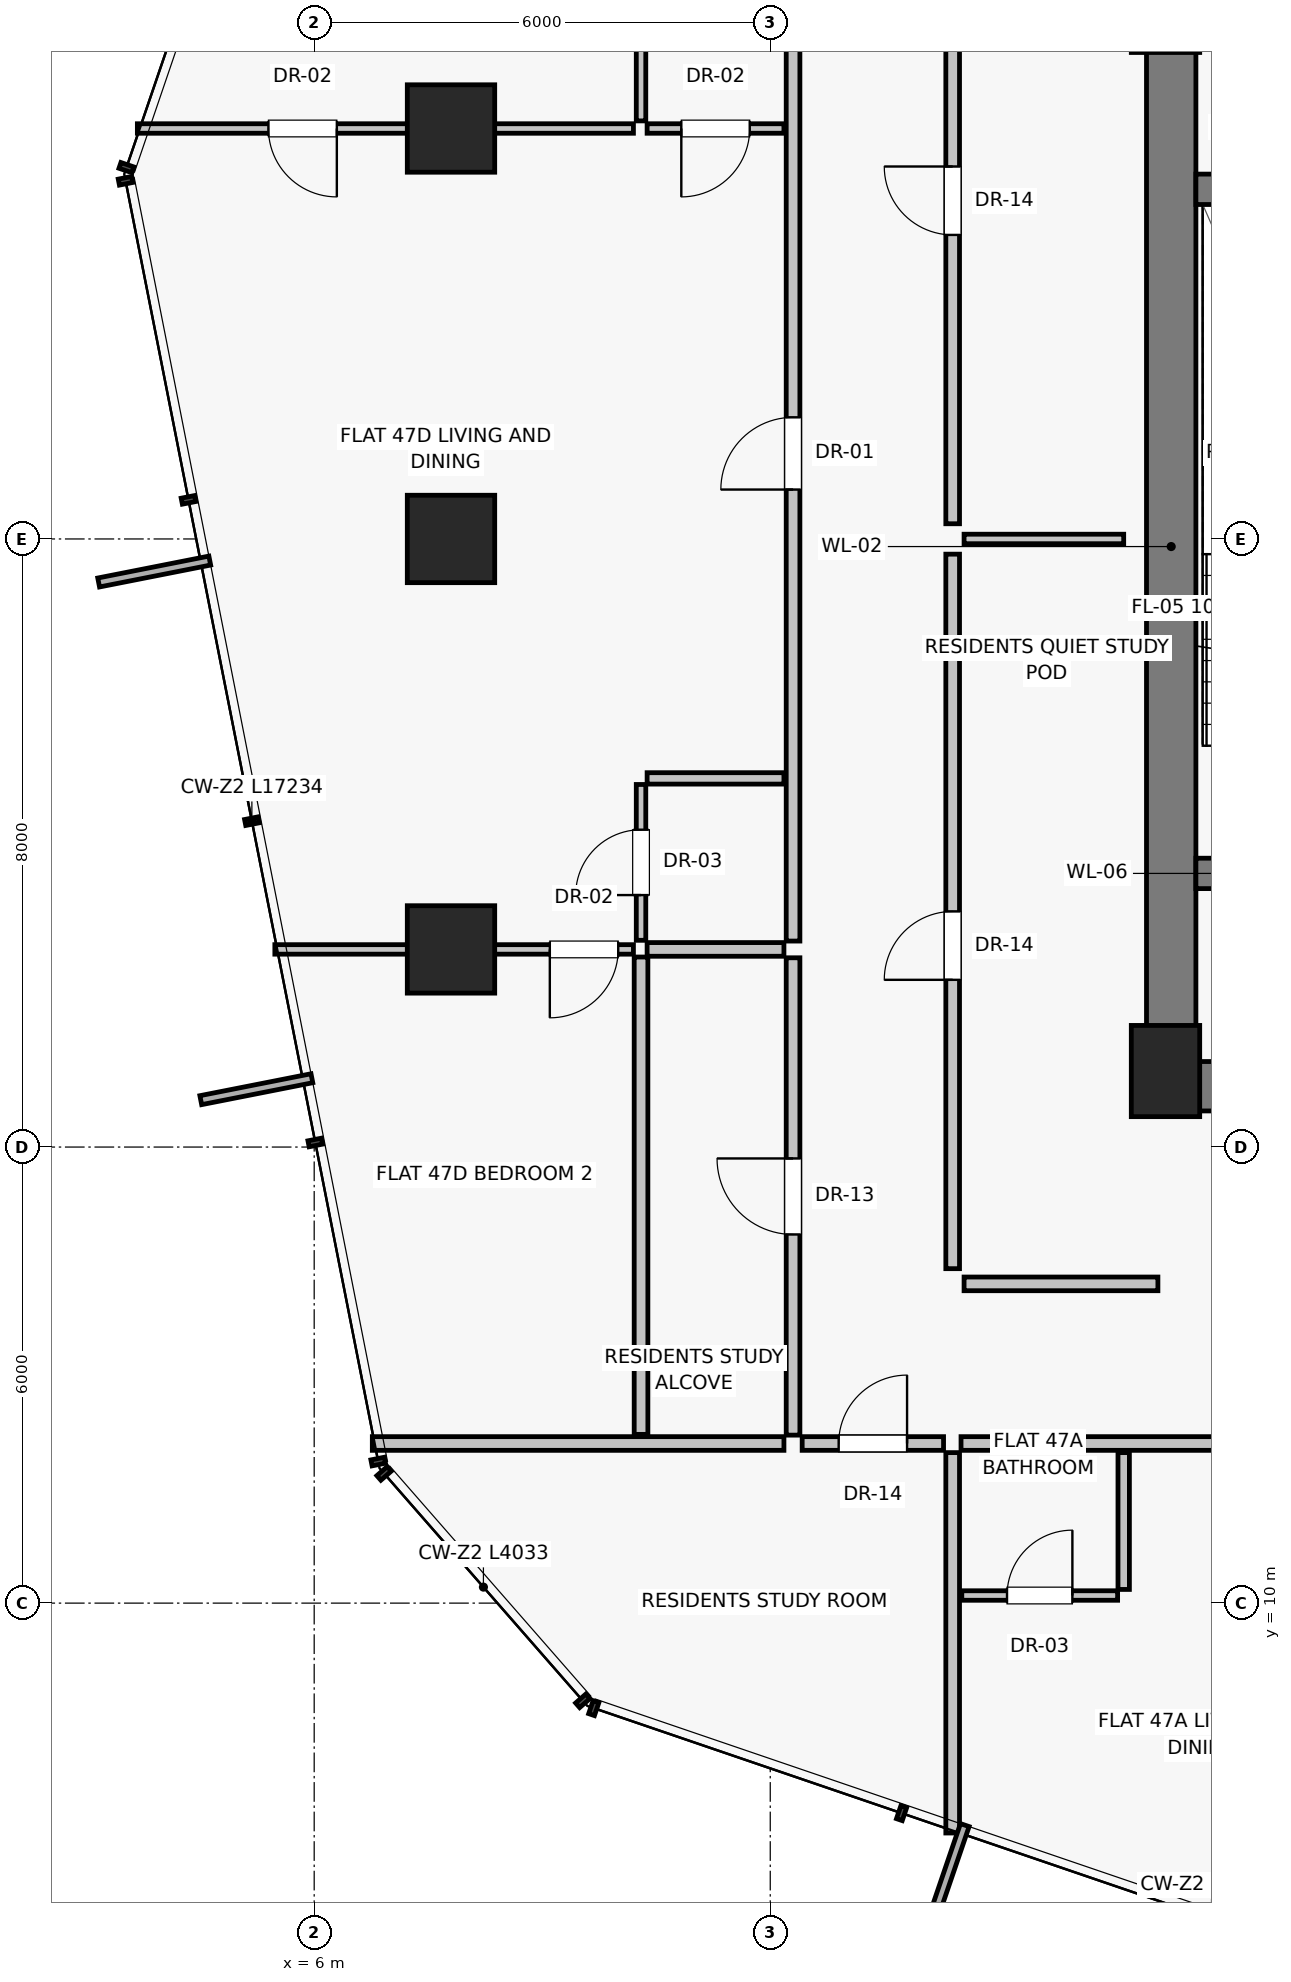
"""IFC4 building model, lengths in metres.
Left out: names, types, materials, properties, quantities, classifications, styles, units other than length and angle.
Written with IfcOpenShell. Run it as: python <this file> out.ifc"""

import sys

from ifc_helpers import new_model, si_unit, direction, frame, frame_2d, origin, origin_2d, place, context, subcontext, project, spatial, rectangle, extrude, source, transform, mapped, element, fill, save


model = new_model("IFC4")
c1 = context("Model", 3, precision=1e-05, world=origin(), true_north=direction((0.0, 1.0)))
c2 = subcontext(c1, "Body", "Model", "MODEL_VIEW")
j1 = project(units=[si_unit("LENGTHUNIT", "METRE"), si_unit("PLANEANGLEUNIT", "RADIAN")], contexts=[c1])
p1 = place(None, origin())
s1 = spatial("IfcSite", under=j1, at=p1, CompositionType="ELEMENT")
p2 = place(p1, origin())
s2 = spatial("IfcBuilding", under=s1, at=p2, CompositionType="ELEMENT")
p3 = place(p2, frame((0.0, 0.0, 166.3)))
s3 = spatial("IfcBuildingStorey", under=s2, at=p3, CompositionType="ELEMENT", Elevation=166.3)
p4 = place(p3, frame((17.2, 17.0, 0.0), z_axis=(0.0, 0.0, 1.0), x_axis=(1.0, 0.0, 0.0)))
e1 = element("IfcColumn", 1, at=p4, inside=s3, PredefinedType="PILASTER", context=c2, shape_type="SweptSolid", body=[
    extrude(rectangle(XDim=0.9, YDim=1.2, at=origin_2d()), origin(), (0.0, 0.0, 1.0), 3.25),
])
for number, where, z_axis, x_axis in (
    (2, (7.8, 29.4, 0.0), (0.0, 0.0, 1.0), (1.0, 0.0, 0.0)),
    (3, (7.8, 24.0, 0.0), (0.0, 0.0, 1.0), (1.0, 0.0, 0.0)),
    (4, (7.8, 18.6, 0.0), (0.0, 0.0, 1.0), (1.0, 0.0, 0.0)),
):
    element("IfcColumn", number, at=place(p3, frame(where, z_axis=z_axis, x_axis=x_axis)), inside=s3, PredefinedType="COLUMN", context=c2, shape_type="SweptSolid", body=[
        extrude(rectangle(XDim=1.15, YDim=1.15, at=origin_2d()), origin(), (0.0, 0.0, 1.0), 3.25),
    ])
p5 = place(p3, frame((17.275, 16.8, 0.0), z_axis=(0.0, 0.0, 1.0), x_axis=(0.0, 1.0, 0.0)))
e5 = element("IfcWall", 5, at=p5, inside=s3, PredefinedType="SHEAR", context=c2, shape_type="SweptSolid", body=[
    extrude(rectangle(XDim=14.2, YDim=0.65, at=frame_2d((7.1, 0.0))), origin(), (0.0, 0.0, 1.0), 2.93),
])
p6 = place(p3, frame((17.2, 16.8, 0.0), z_axis=(0.0, 0.0, 1.0), x_axis=(1.0, 0.0, 0.0)))
e6 = element("IfcWall", 6, at=p6, inside=s3, PredefinedType="SHEAR", context=c2, shape_type="SweptSolid", body=[
    extrude(rectangle(XDim=5.85, YDim=0.65, at=frame_2d((2.925, 0.0))), origin(), (0.0, 0.0, 1.0), 2.93),
])
p7 = place(p6, frame((1.15, 0.0, 0.0)))
e7 = element("IfcOpeningElement", 7, at=p7, cuts=e6, PredefinedType="OPENING", context=c2, shape_type="SweptSolid", body=[
    extrude(rectangle(XDim=1.2, YDim=2.03, at=frame_2d((0.6, 1.015))), frame((0.0, 0.335, 0.0), z_axis=(0.0, -1.0, 0.0), x_axis=(1.0, 0.0, 0.0)), (0.0, 0.0, 1.0), 0.67),
])
p8 = place(p3, frame((17.6, 19.6, 0.0), z_axis=(0.0, 0.0, 1.0), x_axis=(1.0, 0.0, 0.0)))
e8 = element("IfcWall", 8, at=p8, inside=s3, PredefinedType="SHEAR", context=c2, shape_type="SweptSolid", body=[
    extrude(rectangle(XDim=3.4, YDim=0.4, at=frame_2d((1.7, 0.0))), origin(), (0.0, 0.0, 1.0), 2.93),
])
p9 = place(p8, frame((1.05, 0.0, 0.0)))
e9 = element("IfcOpeningElement", 9, at=p9, cuts=e8, PredefinedType="OPENING", context=c2, shape_type="SweptSolid", body=[
    extrude(rectangle(XDim=1.1, YDim=2.03, at=frame_2d((0.55, 1.015))), frame((0.0, 0.21, 0.0), z_axis=(0.0, -1.0, 0.0), x_axis=(1.0, 0.0, 0.0)), (0.0, 0.0, 1.0), 0.42),
])
p10 = place(p3, frame((17.6, 28.6, 0.0), z_axis=(0.0, 0.0, 1.0), x_axis=(1.0, 0.0, 0.0)))
e10 = element("IfcWall", 10, at=p10, inside=s3, PredefinedType="SHEAR", context=c2, shape_type="SweptSolid", body=[
    extrude(rectangle(XDim=3.4, YDim=0.4, at=frame_2d((1.7, 0.0))), origin(), (0.0, 0.0, 1.0), 2.93),
])
p11 = place(p3, frame((14.4, 14.4, 0.0), z_axis=(0.0, 0.0, 1.0), x_axis=(0.0, 1.0, 0.0)))
e11 = element("IfcWall", 11, at=p11, inside=s3, PredefinedType="PARTITIONING", context=c2, shape_type="SweptSolid", body=[
    extrude(rectangle(XDim=9.4, YDim=0.18, at=frame_2d((4.7, 0.0))), origin(), (0.0, 0.0, 1.0), 2.93),
])
p12 = place(p11, frame((3.8, 0.0, 0.0)))
e12 = element("IfcOpeningElement", 12, at=p12, cuts=e11, PredefinedType="OPENING", context=c2, shape_type="SweptSolid", body=[
    extrude(rectangle(XDim=0.9, YDim=2.01, at=frame_2d((0.45, 1.005))), frame((0.0, 0.1, 0.0), z_axis=(0.0, -1.0, 0.0), x_axis=(1.0, 0.0, 0.0)), (0.0, 0.0, 1.0), 0.2),
])
p13 = place(p3, frame((14.4, 24.2, 0.0), z_axis=(0.0, 0.0, 1.0), x_axis=(0.0, 1.0, 0.0)))
e13 = element("IfcWall", 13, at=p13, inside=s3, PredefinedType="PARTITIONING", context=c2, shape_type="SweptSolid", body=[
    extrude(rectangle(XDim=9.2, YDim=0.18, at=frame_2d((4.6, 0.0))), origin(), (0.0, 0.0, 1.0), 2.93),
])
p14 = place(p13, frame((3.8, 0.0, 0.0)))
e14 = element("IfcOpeningElement", 14, at=p14, cuts=e13, PredefinedType="OPENING", context=c2, shape_type="SweptSolid", body=[
    extrude(rectangle(XDim=0.9, YDim=2.01, at=frame_2d((0.45, 1.005))), frame((0.0, 0.1, 0.0), z_axis=(0.0, -1.0, 0.0), x_axis=(1.0, 0.0, 0.0)), (0.0, 0.0, 1.0), 0.2),
])
p15 = place(p3, frame((14.55, 24.0, 0.0), z_axis=(0.0, 0.0, 1.0), x_axis=(1.0, 0.0, 0.0)))
e15 = element("IfcWall", 15, at=p15, inside=s3, PredefinedType="PARTITIONING", context=c2, shape_type="SweptSolid", body=[
    extrude(rectangle(XDim=2.1, YDim=0.125, at=frame_2d((1.05, 0.0))), origin(), (0.0, 0.0, 1.0), 2.93),
])
p16 = place(p3, frame((14.55, 14.2, 0.0), z_axis=(0.0, 0.0, 1.0), x_axis=(1.0, 0.0, 0.0)))
e16 = element("IfcWall", 16, at=p16, inside=s3, PredefinedType="PARTITIONING", context=c2, shape_type="SweptSolid", body=[
    extrude(rectangle(XDim=2.55, YDim=0.18, at=frame_2d((1.275, 0.0))), origin(), (0.0, 0.0, 1.0), 2.93),
])
p17 = place(p3, frame((14.4, 11.98, 0.0), z_axis=(0.0, 0.0, 1.0), x_axis=(0.0, -1.0, 0.0)))
e17 = element("IfcWall", 17, at=p17, inside=s3, PredefinedType="PARTITIONING", context=c2, shape_type="SweptSolid", body=[
    extrude(rectangle(XDim=5.004, YDim=0.18, at=frame_2d((2.502, 0.0))), origin(), (0.0, 0.0, 1.0), 2.93),
])
p18 = place(p3, frame((14.51, 12.1, 0.0), z_axis=(0.0, 0.0, 1.0), x_axis=(1.0, 0.0, 0.0)))
e18 = element("IfcWall", 18, at=p18, inside=s3, PredefinedType="PARTITIONING", context=c2, shape_type="SweptSolid", body=[
    extrude(rectangle(XDim=11.136, YDim=0.18, at=frame_2d((5.568, 0.0))), origin(), (0.0, 0.0, 1.0), 2.51),
])
p19 = place(p18, frame((3.663, 0.0, 0.0)))
e19 = element("IfcOpeningElement", 19, at=p19, cuts=e18, PredefinedType="OPENING", context=c2, shape_type="SweptSolid", body=[
    extrude(rectangle(XDim=0.95, YDim=2.02, at=frame_2d((0.475, 1.01))), frame((0.0, 0.1, 0.0), z_axis=(0.0, -1.0, 0.0), x_axis=(1.0, 0.0, 0.0)), (0.0, 0.0, 1.0), 0.2),
])
p20 = place(p3, frame((16.65, 11.98, 0.0), z_axis=(0.0, 0.0, 1.0), x_axis=(0.0, -1.0, 0.0)))
e20 = element("IfcWall", 20, at=p20, inside=s3, PredefinedType="PARTITIONING", context=c2, shape_type="SweptSolid", body=[
    extrude(rectangle(XDim=1.8, YDim=0.15, at=frame_2d((0.9, 0.0))), origin(), (0.0, 0.0, 1.0), 2.93),
])
p21 = place(p3, frame((14.52, 10.1, 0.0), z_axis=(0.0, 0.0, 1.0), x_axis=(1.0, 0.0, 0.0)))
e21 = element("IfcWall", 21, at=p21, inside=s3, PredefinedType="PARTITIONING", context=c2, shape_type="SweptSolid", body=[
    extrude(rectangle(XDim=2.05, YDim=0.125, at=frame_2d((1.025, 0.0))), origin(), (0.0, 0.0, 1.0), 2.93),
])
p22 = place(p21, frame((0.595, 0.0, 0.0)))
e22 = element("IfcOpeningElement", 22, at=p22, cuts=e21, PredefinedType="OPENING", context=c2, shape_type="SweptSolid", body=[
    extrude(rectangle(XDim=0.86, YDim=2.01, at=frame_2d((0.43, 1.005))), frame((0.0, 0.073, 0.0), z_axis=(0.0, -1.0, 0.0), x_axis=(1.0, 0.0, 0.0)), (0.0, 0.0, 1.0), 0.145),
])
p23 = place(p3, frame((12.18, 12.1, 0.0), z_axis=(0.0, 0.0, 1.0), x_axis=(-1.0, 0.0, 0.0)))
e23 = element("IfcWall", 23, at=p23, inside=s3, PredefinedType="PARTITIONING", context=c2, shape_type="SweptSolid", body=[
    extrude(rectangle(XDim=5.415, YDim=0.18, at=frame_2d((2.708, 0.0))), origin(), (0.0, 0.0, 1.0), 2.93),
])
p24 = place(p3, frame((12.3, 12.21, 0.0), z_axis=(0.0, 0.0, 1.0), x_axis=(0.0, 1.0, 0.0)))
e24 = element("IfcWall", 24, at=p24, inside=s3, PredefinedType="PARTITIONING", context=c2, shape_type="SweptSolid", body=[
    extrude(rectangle(XDim=6.28, YDim=0.18, at=frame_2d((3.14, 0.0))), origin(), (0.0, 0.0, 1.0), 2.51),
])
p25 = place(p24, frame((2.64, 0.0, 0.0)))
e25 = element("IfcOpeningElement", 25, at=p25, cuts=e24, PredefinedType="OPENING", context=c2, shape_type="SweptSolid", body=[
    extrude(rectangle(XDim=1.0, YDim=2.01, at=frame_2d((0.5, 1.005))), frame((0.0, 0.1, 0.0), z_axis=(0.0, -1.0, 0.0), x_axis=(1.0, 0.0, 0.0)), (0.0, 0.0, 1.0), 0.2),
])
p26 = place(p3, frame((12.3, 18.71, 0.0), z_axis=(0.0, 0.0, 1.0), x_axis=(0.0, 1.0, 0.0)))
e26 = element("IfcWall", 26, at=p26, inside=s3, PredefinedType="PARTITIONING", context=c2, shape_type="SweptSolid", body=[
    extrude(rectangle(XDim=16.88, YDim=0.18, at=frame_2d((8.44, 0.0))), origin(), (0.0, 0.0, 1.0), 2.51),
])
p27 = place(p26, frame((5.94, 0.0, 0.0)))
e27 = element("IfcOpeningElement", 27, at=p27, cuts=e26, PredefinedType="OPENING", context=c2, shape_type="SweptSolid", body=[
    extrude(rectangle(XDim=0.95, YDim=2.02, at=frame_2d((0.475, 1.01))), frame((0.0, 0.1, 0.0), z_axis=(0.0, -1.0, 0.0), x_axis=(1.0, 0.0, 0.0)), (0.0, 0.0, 1.0), 0.2),
])
p28 = place(p3, frame((10.3, 12.22, 0.0), z_axis=(0.0, 0.0, 1.0), x_axis=(0.0, 1.0, 0.0)))
e28 = element("IfcWall", 28, at=p28, inside=s3, PredefinedType="PARTITIONING", context=c2, shape_type="SweptSolid", body=[
    extrude(rectangle(XDim=6.28, YDim=0.18, at=frame_2d((3.14, 0.0))), origin(), (0.0, 0.0, 1.0), 2.93),
])
p29 = place(p3, frame((12.18, 18.6, 0.0), z_axis=(0.0, 0.0, 1.0), x_axis=(-1.0, 0.0, 0.0)))
e29 = element("IfcWall", 29, at=p29, inside=s3, PredefinedType="PARTITIONING", context=c2, shape_type="SweptSolid", body=[
    extrude(rectangle(XDim=1.8, YDim=0.18, at=frame_2d((0.9, 0.0))), origin(), (0.0, 0.0, 1.0), 2.308),
])
p30 = place(p3, frame((10.2, 18.6, 0.0), z_axis=(0.0, 0.0, 1.0), x_axis=(-1.0, 0.0, 0.0)))
e30 = element("IfcWall", 30, at=p30, inside=s3, PredefinedType="PARTITIONING", context=c2, shape_type="SweptSolid", body=[
    extrude(rectangle(XDim=4.718, YDim=0.125, at=frame_2d((2.359, 0.0))), origin(), (0.0, 0.0, 1.0), 2.308),
])
p31 = place(p30, frame((0.2, 0.0, 0.0)))
e31 = element("IfcOpeningElement", 31, at=p31, cuts=e30, PredefinedType="OPENING", context=c2, shape_type="SweptSolid", body=[
    extrude(rectangle(XDim=0.9, YDim=2.01, at=frame_2d((0.45, 1.005))), frame((0.0, 0.073, 0.0), z_axis=(0.0, -1.0, 0.0), x_axis=(1.0, 0.0, 0.0)), (0.0, 0.0, 1.0), 0.145),
])
p32 = place(p3, frame((12.18, 20.85, 0.0), z_axis=(0.0, 0.0, 1.0), x_axis=(-1.0, 0.0, 0.0)))
e32 = element("IfcWall", 32, at=p32, inside=s3, PredefinedType="PARTITIONING", context=c2, shape_type="SweptSolid", body=[
    extrude(rectangle(XDim=1.8, YDim=0.15, at=frame_2d((0.9, 0.0))), origin(), (0.0, 0.0, 1.0), 2.93),
])
p33 = place(p3, frame((10.3, 18.72, 0.0), z_axis=(0.0, 0.0, 1.0), x_axis=(0.0, 1.0, 0.0)))
e33 = element("IfcWall", 33, at=p33, inside=s3, PredefinedType="PARTITIONING", context=c2, shape_type="SweptSolid", body=[
    extrude(rectangle(XDim=2.05, YDim=0.125, at=frame_2d((1.025, 0.0))), origin(), (0.0, 0.0, 1.0), 2.93),
])
p34 = place(p33, frame((0.595, 0.0, 0.0)))
e34 = element("IfcOpeningElement", 34, at=p34, cuts=e33, PredefinedType="OPENING", context=c2, shape_type="SweptSolid", body=[
    extrude(rectangle(XDim=0.86, YDim=2.01, at=frame_2d((0.43, 1.005))), frame((0.0, 0.073, 0.0), z_axis=(0.0, -1.0, 0.0), x_axis=(1.0, 0.0, 0.0)), (0.0, 0.0, 1.0), 0.145),
])
p35 = place(p3, frame((12.18, 29.4, 0.0), z_axis=(0.0, 0.0, 1.0), x_axis=(-1.0, 0.0, 0.0)))
e35 = element("IfcWall", 35, at=p35, inside=s3, PredefinedType="PARTITIONING", context=c2, shape_type="SweptSolid", body=[
    extrude(rectangle(XDim=1.8, YDim=0.125, at=frame_2d((0.9, 0.0))), origin(), (0.0, 0.0, 1.0), 2.308),
])
p36 = place(p35, frame((0.45, 0.0, 0.0)))
e36 = element("IfcOpeningElement", 36, at=p36, cuts=e35, PredefinedType="OPENING", context=c2, shape_type="SweptSolid", body=[
    extrude(rectangle(XDim=0.9, YDim=2.01, at=frame_2d((0.45, 1.005))), frame((0.0, 0.073, 0.0), z_axis=(0.0, -1.0, 0.0), x_axis=(1.0, 0.0, 0.0)), (0.0, 0.0, 1.0), 0.145),
])
p37 = place(p3, frame((10.3, 29.5, 0.0), z_axis=(0.0, 0.0, 1.0), x_axis=(0.0, 1.0, 0.0)))
e37 = element("IfcWall", 37, at=p37, inside=s3, PredefinedType="PARTITIONING", context=c2, shape_type="SweptSolid", body=[
    extrude(rectangle(XDim=6.08, YDim=0.125, at=frame_2d((3.04, 0.0))), origin(), (0.0, 0.0, 1.0), 2.93),
])
p38 = place(p3, frame((10.2, 29.4, 0.0), z_axis=(0.0, 0.0, 1.0), x_axis=(-1.0, 0.0, 0.0)))
e38 = element("IfcWall", 38, at=p38, inside=s3, PredefinedType="PARTITIONING", context=c2, shape_type="SweptSolid", body=[
    extrude(rectangle(XDim=6.526, YDim=0.125, at=frame_2d((3.263, 0.0))), origin(), (0.0, 0.0, 1.0), 2.308),
])
p39 = place(p38, frame((3.902, 0.0, 0.0)))
e39 = element("IfcOpeningElement", 39, at=p39, cuts=e38, PredefinedType="OPENING", context=c2, shape_type="SweptSolid", body=[
    extrude(rectangle(XDim=0.9, YDim=2.01, at=frame_2d((0.45, 1.005))), frame((0.0, 0.073, 0.0), z_axis=(0.0, -1.0, 0.0), x_axis=(1.0, 0.0, 0.0)), (0.0, 0.0, 1.0), 0.145),
])
p40 = place(p3, frame((12.42, 12.1, 0.0), z_axis=(0.0, 0.0, 1.0), x_axis=(1.0, 0.0, 0.0)))
e40 = element("IfcWall", 40, at=p40, inside=s3, PredefinedType="PARTITIONING", context=c2, shape_type="SweptSolid", body=[
    extrude(rectangle(XDim=1.86, YDim=0.18, at=frame_2d((0.93, 0.0))), origin(), (0.0, 0.0, 1.0), 2.93),
])
p41 = place(p40, frame((0.48, 0.0, 0.0)))
e41 = element("IfcOpeningElement", 41, at=p41, cuts=e40, PredefinedType="OPENING", context=c2, shape_type="SweptSolid", body=[
    extrude(rectangle(XDim=0.9, YDim=2.01, at=frame_2d((0.45, 1.005))), frame((0.0, 0.1, 0.0), z_axis=(0.0, -1.0, 0.0), x_axis=(1.0, 0.0, 0.0)), (0.0, 0.0, 1.0), 0.2),
])
m1 = source(origin(), c2, "Body", "SweptSolid", [
    extrude(rectangle(XDim=0.9, YDim=2.01, at=frame_2d((0.45, 1.005))), frame((0.0, 0.025, 0.0), z_axis=(0.0, -1.0, 0.0), x_axis=(1.0, 0.0, 0.0)), (0.0, 0.0, 1.0), 0.05),
])
p42 = place(p12, origin())
e42 = element("IfcDoor", 42, at=p42, inside=s3, OperationType="SINGLE_SWING_LEFT", PredefinedType="DOOR", context=c2, shape_type="MappedRepresentation", body=[
    mapped(m1, transform((0.0, 0.0, 0.0), scale=1.0)),
])
fill(e12, e42)
p43 = place(p14, origin())
e43 = element("IfcDoor", 43, at=p43, inside=s3, OperationType="SINGLE_SWING_RIGHT", PredefinedType="DOOR", context=c2, shape_type="MappedRepresentation", body=[
    mapped(m1, transform((0.0, 0.0, 0.0), scale=1.0)),
])
fill(e14, e43)
m2 = source(origin(), c2, "Body", "SweptSolid", [
    extrude(rectangle(XDim=0.86, YDim=2.01, at=frame_2d((0.43, 1.005))), frame((0.0, 0.025, 0.0), z_axis=(0.0, -1.0, 0.0), x_axis=(1.0, 0.0, 0.0)), (0.0, 0.0, 1.0), 0.05),
])
p44 = place(p22, origin())
e44 = element("IfcDoor", 44, at=p44, inside=s3, OperationType="SINGLE_SWING_RIGHT", PredefinedType="DOOR", context=c2, shape_type="MappedRepresentation", body=[
    mapped(m2, transform((0.0, 0.0, 0.0), scale=1.0)),
])
fill(e22, e44)
m3 = source(origin(), c2, "Body", "SweptSolid", [
    extrude(rectangle(XDim=1.0, YDim=2.01, at=frame_2d((0.5, 1.005))), frame((0.0, 0.025, 0.0), z_axis=(0.0, -1.0, 0.0), x_axis=(1.0, 0.0, 0.0)), (0.0, 0.0, 1.0), 0.05),
])
p45 = place(p25, origin())
e45 = element("IfcDoor", 45, at=p45, inside=s3, OperationType="SINGLE_SWING_RIGHT", PredefinedType="DOOR", context=c2, shape_type="MappedRepresentation", body=[
    mapped(m3, transform((0.0, 0.0, 0.0), scale=1.0)),
])
fill(e25, e45)
m4 = source(origin(), c2, "Body", "SweptSolid", [
    extrude(rectangle(XDim=0.95, YDim=2.02, at=frame_2d((0.475, 1.01))), frame((0.0, 0.025, 0.0), z_axis=(0.0, -1.0, 0.0), x_axis=(1.0, 0.0, 0.0)), (0.0, 0.0, 1.0), 0.05),
])
p46 = place(p27, origin())
e46 = element("IfcDoor", 46, at=p46, inside=s3, OperationType="SINGLE_SWING_LEFT", PredefinedType="DOOR", context=c2, shape_type="MappedRepresentation", body=[
    mapped(m4, transform((0.0, 0.0, 0.0), scale=1.0)),
])
fill(e27, e46)
p47 = place(p31, origin())
e47 = element("IfcDoor", 47, at=p47, inside=s3, OperationType="SINGLE_SWING_RIGHT", PredefinedType="DOOR", context=c2, shape_type="MappedRepresentation", body=[
    mapped(m1, transform((0.0, 0.0, 0.0), scale=1.0)),
])
fill(e31, e47)
p48 = place(p34, origin())
e48 = element("IfcDoor", 48, at=p48, inside=s3, OperationType="SINGLE_SWING_LEFT", PredefinedType="DOOR", context=c2, shape_type="MappedRepresentation", body=[
    mapped(m2, transform((0.0, 0.0, 0.0), scale=1.0)),
])
fill(e34, e48)
p49 = place(p36, origin())
e49 = element("IfcDoor", 49, at=p49, inside=s3, OperationType="SINGLE_SWING_RIGHT", PredefinedType="DOOR", context=c2, shape_type="MappedRepresentation", body=[
    mapped(m1, transform((0.0, 0.0, 0.0), scale=1.0)),
])
fill(e36, e49)
p50 = place(p39, origin())
e50 = element("IfcDoor", 50, at=p50, inside=s3, OperationType="SINGLE_SWING_LEFT", PredefinedType="DOOR", context=c2, shape_type="MappedRepresentation", body=[
    mapped(m1, transform((0.0, 0.0, 0.0), scale=1.0)),
])
fill(e39, e50)
p51 = place(p41, origin())
e51 = element("IfcDoor", 51, at=p51, inside=s3, OperationType="SINGLE_SWING_RIGHT", PredefinedType="DOOR", context=c2, shape_type="MappedRepresentation", body=[
    mapped(m1, transform((0.0, 0.0, 0.0), scale=1.0)),
])
fill(e41, e51)
save(model, sys.argv[1])
